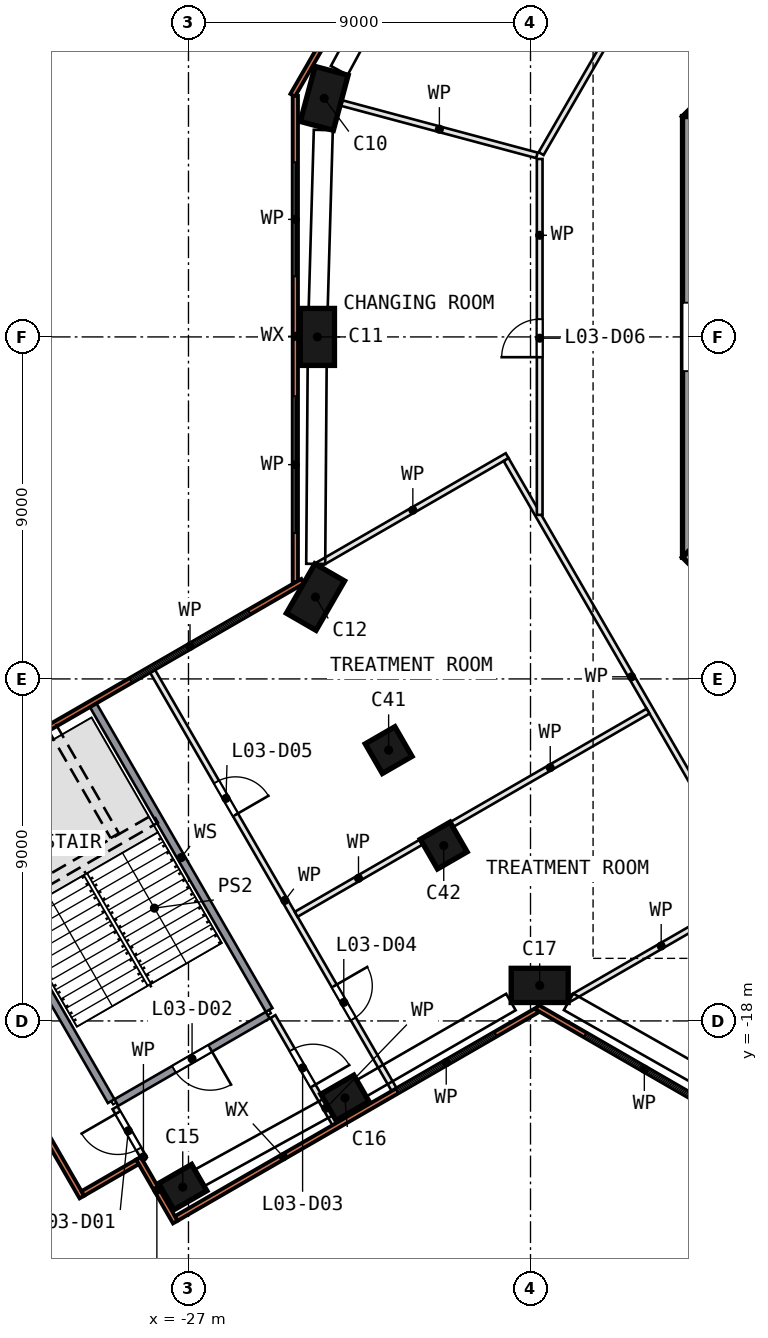
"""IFC4 building model, lengths in metres.
Left out: names, types, materials, properties, quantities, classifications, styles, units other than length and angle.
Written with IfcOpenShell. Run it as: python <this file> out.ifc"""

import sys

from ifc_helpers import new_model, si_unit, direction, frame, frame_2d, origin, origin_2d, place, context, subcontext, project, spatial, rectangle, extrude, element, fill, save


model = new_model("IFC4")
c1 = context("Model", 3, precision=1e-05, world=origin(), true_north=direction((0.0, 1.0)))
c2 = subcontext(c1, "Body", "Model", "MODEL_VIEW")
j1 = project(units=[si_unit("LENGTHUNIT", "METRE"), si_unit("PLANEANGLEUNIT", "RADIAN")], contexts=[c1])
p1 = place(None, origin())
s1 = spatial("IfcSite", under=j1, at=p1, CompositionType="ELEMENT")
p2 = place(p1, origin())
s2 = spatial("IfcBuilding", under=s1, at=p2, CompositionType="ELEMENT")
p3 = place(p2, frame((0.0, 0.0, 19.0)))
s3 = spatial("IfcBuildingStorey", under=s2, at=p3, CompositionType="ELEMENT", Elevation=19.0)
for number, where, z_axis, x_axis in (
    (1, (-23.428, 6.278, 0.0), (0.0, 0.0, 1.0), (0.259, 0.966, 0.0)),
    (2, (-23.608, 0.0, 0.0), (0.0, 0.0, 1.0), (0.0, -1.0, 0.0)),
    (3, (-23.658, -6.846, 0.0), (0.0, 0.0, 1.0), (0.5, 0.866, 0.0)),
):
    element("IfcColumn", number, at=place(p3, frame(where, z_axis=z_axis, x_axis=x_axis)), inside=s3, PredefinedType="COLUMN", context=c2, shape_type="SweptSolid", body=[
        extrude(rectangle(XDim=1.5, YDim=0.9, at=origin_2d()), origin(), (0.0, 0.0, 1.0), 4.05),
    ])
for number, where, z_axis, x_axis in (
    (4, (-27.151, -22.373, 0.0), (0.0, 0.0, 1.0), (0.866, 0.5, 0.0)),
    (5, (-22.883, -20.024, 0.0), (0.0, 0.0, 1.0), (0.866, 0.5, 0.0)),
):
    element("IfcColumn", number, at=place(p3, frame(where, z_axis=z_axis, x_axis=x_axis)), inside=s3, PredefinedType="COLUMN", context=c2, shape_type="SweptSolid", body=[
        extrude(rectangle(XDim=1.0, YDim=0.8, at=origin_2d()), origin(), (0.0, 0.0, 1.0), 4.05),
    ])
p4 = place(p3, frame((-17.758, -17.065, 0.0), z_axis=(0.0, 0.0, 1.0), x_axis=(-1.0, 0.0, 0.0)))
e6 = element("IfcColumn", 6, at=p4, inside=s3, PredefinedType="COLUMN", context=c2, shape_type="SweptSolid", body=[
    extrude(rectangle(XDim=1.5, YDim=0.9, at=origin_2d()), origin(), (0.0, 0.0, 1.0), 4.05),
])
for number, where, z_axis, x_axis in (
    (7, (-21.733, -10.873, 0.0), (0.0, 0.0, 1.0), (-0.866, -0.5, 0.0)),
    (8, (-20.283, -13.385, 0.0), (0.0, 0.0, 1.0), (-0.866, -0.5, 0.0)),
):
    element("IfcColumn", number, at=place(p3, frame(where, z_axis=z_axis, x_axis=x_axis)), inside=s3, PredefinedType="COLUMN", context=c2, shape_type="SweptSolid", body=[
        extrude(rectangle(XDim=0.9, YDim=0.9, at=origin_2d()), origin(), (0.0, 0.0, 1.0), 4.05),
    ])
p5 = place(p3, frame((-5.481, 13.682, 0.0), z_axis=(0.0, 0.0, 1.0), x_axis=(-0.707106781, -0.707106781, 0.0)))
e9 = element("IfcWall", 9, at=p5, inside=s3, PredefinedType="SHEAR", context=c2, shape_type="SweptSolid", body=[
    extrude(rectangle(XDim=11.598, YDim=0.9, at=frame_2d((5.799, 0.0))), origin(), (0.0, 0.0, 1.0), 4.5),
])
p6 = place(p3, frame((-13.55, 5.799, 0.0), z_axis=(0.0, 0.0, 1.0), x_axis=(0.0, -1.0, 0.0)))
e10 = element("IfcWall", 10, at=p6, inside=s3, PredefinedType="SHEAR", context=c2, shape_type="SweptSolid", body=[
    extrude(rectangle(XDim=11.598, YDim=0.9, at=frame_2d((5.799, 0.0))), origin(), (0.0, 0.0, 1.0), 4.5),
])
p7 = place(p6, frame((4.899, 0.0, 0.0)))
e11 = element("IfcOpeningElement", 11, at=p7, cuts=e10, PredefinedType="OPENING", context=c2, shape_type="SweptSolid", body=[
    extrude(rectangle(XDim=1.8, YDim=2.1, at=frame_2d((0.9, 1.05))), frame((0.0, 0.46, 0.0), z_axis=(0.0, -1.0, 0.0), x_axis=(1.0, 0.0, 0.0)), (0.0, 0.0, 1.0), 0.92),
])
p8 = place(p3, frame((-13.682, -5.481, 0.0), z_axis=(0.0, 0.0, 1.0), x_axis=(0.707106781, -0.707106781, 0.0)))
e12 = element("IfcWall", 12, at=p8, inside=s3, PredefinedType="SHEAR", context=c2, shape_type="SweptSolid", body=[
    extrude(rectangle(XDim=11.598, YDim=0.9, at=frame_2d((5.799, 0.0))), origin(), (0.0, 0.0, 1.0), 4.5),
])
p9 = place(p8, frame((2.099, 0.0, 0.0)))
e13 = element("IfcOpeningElement", 13, at=p9, cuts=e12, PredefinedType="OPENING", context=c2, shape_type="SweptSolid", body=[
    extrude(rectangle(XDim=1.2, YDim=2.1, at=frame_2d((0.6, 1.05))), frame((0.0, 0.46, 0.0), z_axis=(0.0, -1.0, 0.0), x_axis=(1.0, 0.0, 0.0)), (0.0, 0.0, 1.0), 0.92),
])
p10 = place(p3, frame((-17.777, 17.586, 0.0), z_axis=(0.0, 0.0, 1.0), x_axis=(-0.500006139, -0.866021859, 0.0)))
e14 = element("IfcWall", 14, at=p10, inside=s3, PredefinedType="SOLIDWALL", context=c2, shape_type="SweptSolid", body=[
    extrude(rectangle(XDim=12.962, YDim=0.14, at=frame_2d((6.481, 0.0))), origin(), (0.0, 0.0, 1.0), 4.05),
])
p11 = place(p10, frame((1.748, 0.0, 0.9)))
e15 = element("IfcOpeningElement", 15, at=p11, cuts=e14, PredefinedType="OPENING", context=c2, shape_type="SweptSolid", body=[
    extrude(rectangle(XDim=3.0, YDim=2.4, at=frame_2d((1.5, 1.2))), frame((0.0, 0.08, 0.0), z_axis=(0.0, -1.0, 0.0), x_axis=(1.0, 0.0, 0.0)), (0.0, 0.0, 1.0), 0.16),
])
p12 = place(p10, frame((7.935, 0.0, 0.9)))
e16 = element("IfcOpeningElement", 16, at=p12, cuts=e14, PredefinedType="OPENING", context=c2, shape_type="SweptSolid", body=[
    extrude(rectangle(XDim=3.0, YDim=2.4, at=frame_2d((1.5, 1.2))), frame((0.0, 0.08, 0.0), z_axis=(0.0, -1.0, 0.0), x_axis=(1.0, 0.0, 0.0)), (0.0, 0.0, 1.0), 0.16),
])
p13 = place(p3, frame((-24.188, 6.341, 0.0), z_axis=(0.0, 0.0, 1.0), x_axis=(0.0, -1.0, 0.0)))
e17 = element("IfcWall", 17, at=p13, inside=s3, PredefinedType="SOLIDWALL", context=c2, shape_type="SweptSolid", body=[
    extrude(rectangle(XDim=12.801, YDim=0.14, at=frame_2d((6.4, 0.0))), origin(), (0.0, 0.0, 1.0), 4.05),
])
p14 = place(p13, frame((1.748, 0.0, 0.9)))
e18 = element("IfcOpeningElement", 18, at=p14, cuts=e17, PredefinedType="OPENING", context=c2, shape_type="SweptSolid", body=[
    extrude(rectangle(XDim=3.0, YDim=2.4, at=frame_2d((1.5, 1.2))), frame((0.0, 0.08, 0.0), z_axis=(0.0, -1.0, 0.0), x_axis=(1.0, 0.0, 0.0)), (0.0, 0.0, 1.0), 0.16),
])
p15 = place(p13, frame((7.902, 0.0, 0.9)))
e19 = element("IfcOpeningElement", 19, at=p15, cuts=e17, PredefinedType="OPENING", context=c2, shape_type="SweptSolid", body=[
    extrude(rectangle(XDim=3.6, YDim=2.4, at=frame_2d((1.8, 1.2))), frame((0.0, 0.08, 0.0), z_axis=(0.0, -1.0, 0.0), x_axis=(1.0, 0.0, 0.0)), (0.0, 0.0, 1.0), 0.16),
])
p16 = place(p3, frame((-23.995, -6.429, 0.0), z_axis=(0.0, 0.0, 1.0), x_axis=(-0.866018753, -0.500011519, 0.0)))
e20 = element("IfcWall", 20, at=p16, inside=s3, PredefinedType="SOLIDWALL", context=c2, shape_type="SweptSolid", body=[
    extrude(rectangle(XDim=11.405, YDim=0.14, at=frame_2d((5.703, 0.0))), origin(), (0.0, 0.0, 1.0), 4.05),
])
p17 = place(p16, frame((1.623, 0.0, 0.9)))
e21 = element("IfcOpeningElement", 21, at=p17, cuts=e20, PredefinedType="OPENING", context=c2, shape_type="SweptSolid", body=[
    extrude(rectangle(XDim=3.6, YDim=2.4, at=frame_2d((1.8, 1.2))), frame((0.0, 0.08, 0.0), z_axis=(0.0, -1.0, 0.0), x_axis=(1.0, 0.0, 0.0)), (0.0, 0.0, 1.0), 0.16),
])
p18 = place(p3, frame((-30.775, -20.955, 0.0), z_axis=(0.0, 0.0, 1.0), x_axis=(0.499969368, -0.866043088, 0.0)))
e22 = element("IfcWall", 22, at=p18, inside=s3, PredefinedType="SOLIDWALL", context=c2, shape_type="SweptSolid", body=[
    extrude(rectangle(XDim=1.94, YDim=0.14, at=frame_2d((0.97, 0.0))), origin(), (0.0, 0.0, 1.0), 4.05),
])
p19 = place(p3, frame((-29.78, -22.54, 0.0), z_axis=(0.0, 0.0, 1.0), x_axis=(0.865989634, 0.500061949, 0.0)))
e23 = element("IfcWall", 23, at=p19, inside=s3, PredefinedType="SOLIDWALL", context=c2, shape_type="SweptSolid", body=[
    extrude(rectangle(XDim=1.66, YDim=0.14, at=frame_2d((0.83, 0.0))), origin(), (0.0, 0.0, 1.0), 4.05),
])
p20 = place(p3, frame((-28.317, -21.614, 0.0), z_axis=(0.0, 0.0, 1.0), x_axis=(0.499969368, -0.866043088, 0.0)))
e24 = element("IfcWall", 24, at=p20, inside=s3, PredefinedType="SOLIDWALL", context=c2, shape_type="SweptSolid", body=[
    extrude(rectangle(XDim=1.94, YDim=0.14, at=frame_2d((0.97, 0.0))), origin(), (0.0, 0.0, 1.0), 4.05),
])
p21 = place(p3, frame((-27.321, -23.198, 0.0), z_axis=(0.0, 0.0, 1.0), x_axis=(0.866030546, 0.499991093, 0.0)))
e25 = element("IfcWall", 25, at=p21, inside=s3, PredefinedType="SOLIDWALL", context=c2, shape_type="SweptSolid", body=[
    extrude(rectangle(XDim=10.961, YDim=0.14, at=frame_2d((5.48, 0.0))), origin(), (0.0, 0.0, 1.0), 4.05),
])
p22 = place(p21, frame((6.702, 0.0, 0.9)))
e26 = element("IfcOpeningElement", 26, at=p22, cuts=e25, PredefinedType="OPENING", context=c2, shape_type="SweptSolid", body=[
    extrude(rectangle(XDim=3.0, YDim=2.4, at=frame_2d((1.5, 1.2))), frame((0.0, 0.08, 0.0), z_axis=(0.0, -1.0, 0.0), x_axis=(1.0, 0.0, 0.0)), (0.0, 0.0, 1.0), 0.16),
])
p23 = place(p3, frame((-17.828, -17.637, 0.0), z_axis=(0.0, 0.0, 1.0), x_axis=(0.866029009, -0.499993756, 0.0)))
e27 = element("IfcWall", 27, at=p23, inside=s3, PredefinedType="SOLIDWALL", context=c2, shape_type="SweptSolid", body=[
    extrude(rectangle(XDim=13.242, YDim=0.14, at=frame_2d((6.621, 0.0))), origin(), (0.0, 0.0, 1.0), 4.05),
])
p24 = place(p23, frame((1.46, 0.0, 0.9)))
e28 = element("IfcOpeningElement", 28, at=p24, cuts=e27, PredefinedType="OPENING", context=c2, shape_type="SweptSolid", body=[
    extrude(rectangle(XDim=3.6, YDim=2.4, at=frame_2d((1.8, 1.2))), frame((0.0, 0.08, 0.0), z_axis=(0.0, -1.0, 0.0), x_axis=(1.0, 0.0, 0.0)), (0.0, 0.0, 1.0), 0.16),
])
p25 = place(p23, frame((8.215, 0.0, 0.9)))
e29 = element("IfcOpeningElement", 29, at=p25, cuts=e27, PredefinedType="OPENING", context=c2, shape_type="SweptSolid", body=[
    extrude(rectangle(XDim=3.0, YDim=2.4, at=frame_2d((1.5, 1.2))), frame((0.0, 0.08, 0.0), z_axis=(0.0, -1.0, 0.0), x_axis=(1.0, 0.0, 0.0)), (0.0, 0.0, 1.0), 0.16),
])
p26 = place(p3, frame((-32.807, -13.577, 0.0), z_axis=(0.0, 0.0, 1.0), x_axis=(0.50000534, -0.866022321, 0.0)))
e30 = element("IfcWall", 30, at=p26, inside=s3, PredefinedType="SOLIDWALL", context=c2, shape_type="SweptSolid", body=[
    extrude(rectangle(XDim=7.545, YDim=0.2, at=frame_2d((3.773, 0.0))), origin(), (0.0, 0.0, 1.0), 4.05),
])
p27 = place(p3, frame((-28.162, -21.623, 0.0), z_axis=(0.0, 0.0, 1.0), x_axis=(-0.499877454, 0.866096144, 0.0)))
e31 = element("IfcWall", 31, at=p27, inside=s3, PredefinedType="PARTITIONING", context=c2, shape_type="SweptSolid", body=[
    extrude(rectangle(XDim=1.545, YDim=0.15, at=frame_2d((0.773, 0.0))), origin(), (0.0, 0.0, 1.0), 4.05),
])
p28 = place(p27, frame((0.295, 0.0, 0.0)))
e32 = element("IfcOpeningElement", 32, at=p28, cuts=e31, PredefinedType="OPENING", context=c2, shape_type="SweptSolid", body=[
    extrude(rectangle(XDim=1.1, YDim=2.1, at=frame_2d((0.55, 1.05))), frame((0.0, 0.085, 0.0), z_axis=(0.0, -1.0, 0.0), x_axis=(1.0, 0.0, 0.0)), (0.0, 0.0, 1.0), 0.17),
])
p29 = place(p3, frame((-24.914, -17.848, 0.0), z_axis=(0.0, 0.0, 1.0), x_axis=(-0.86601677, -0.500014953, 0.0)))
e33 = element("IfcWall", 33, at=p29, inside=s3, PredefinedType="SOLIDWALL", context=c2, shape_type="SweptSolid", body=[
    extrude(rectangle(XDim=4.6, YDim=0.2, at=frame_2d((2.3, 0.0))), origin(), (0.0, 0.0, 1.0), 4.05),
])
p30 = place(p29, frame((1.75, 0.0, 0.0)))
e34 = element("IfcOpeningElement", 34, at=p30, cuts=e33, PredefinedType="OPENING", context=c2, shape_type="SweptSolid", body=[
    extrude(rectangle(XDim=1.1, YDim=2.1, at=frame_2d((0.55, 1.05))), frame((0.0, 0.11, 0.0), z_axis=(0.0, -1.0, 0.0), x_axis=(1.0, 0.0, 0.0)), (0.0, 0.0, 1.0), 0.22),
])
p31 = place(p3, frame((-24.877, -17.712, 0.0), z_axis=(0.0, 0.0, 1.0), x_axis=(-0.499984148, 0.866034555, 0.0)))
e35 = element("IfcWall", 35, at=p31, inside=s3, PredefinedType="SOLIDWALL", context=c2, shape_type="SweptSolid", body=[
    extrude(rectangle(XDim=9.26, YDim=0.2, at=frame_2d((4.63, 0.0))), origin(), (0.0, 0.0, 1.0), 4.05),
])
p32 = place(p3, frame((-22.965, 6.153, 0.0), z_axis=(0.0, 0.0, 1.0), x_axis=(0.965919345, -0.258843233, 0.0)))
e36 = element("IfcWall", 36, at=p32, inside=s3, PredefinedType="PARTITIONING", context=c2, shape_type="SweptSolid", body=[
    extrude(rectangle(XDim=5.315, YDim=0.15, at=frame_2d((2.657, 0.0))), origin(), (0.0, 0.0, 1.0), 4.05),
])
p33 = place(p3, frame((-24.777, -17.885, 0.0), z_axis=(0.0, 0.0, 1.0), x_axis=(0.499996863, -0.866027215, 0.0)))
e37 = element("IfcWall", 37, at=p33, inside=s3, PredefinedType="PARTITIONING", context=c2, shape_type="SweptSolid", body=[
    extrude(rectangle(XDim=3.26, YDim=0.15, at=frame_2d((1.63, 0.0))), origin(), (0.0, 0.0, 1.0), 4.05),
])
p34 = place(p33, frame((1.01, 0.0, 0.0)))
e38 = element("IfcOpeningElement", 38, at=p34, cuts=e37, PredefinedType="OPENING", context=c2, shape_type="SweptSolid", body=[
    extrude(rectangle(XDim=1.1, YDim=2.1, at=frame_2d((0.55, 1.05))), frame((0.0, 0.085, 0.0), z_axis=(0.0, -1.0, 0.0), x_axis=(1.0, 0.0, 0.0)), (0.0, 0.0, 1.0), 0.17),
])
p35 = place(p3, frame((-27.948, -8.792, 0.0), z_axis=(0.0, 0.0, 1.0), x_axis=(0.499991053, -0.866030569, 0.0)))
e39 = element("IfcWall", 39, at=p35, inside=s3, PredefinedType="PARTITIONING", context=c2, shape_type="SweptSolid", body=[
    extrude(rectangle(XDim=12.72, YDim=0.15, at=frame_2d((6.36, 0.0))), origin(), (0.0, 0.0, 1.0), 4.05),
])
p36 = place(p35, frame((9.57, 0.0, 0.0)))
e40 = element("IfcOpeningElement", 40, at=p36, cuts=e39, PredefinedType="OPENING", context=c2, shape_type="SweptSolid", body=[
    extrude(rectangle(XDim=1.0, YDim=2.1, at=frame_2d((0.5, 1.05))), frame((0.0, 0.085, 0.0), z_axis=(0.0, -1.0, 0.0), x_axis=(1.0, 0.0, 0.0)), (0.0, 0.0, 1.0), 0.17),
])
p37 = place(p35, frame((3.37, 0.0, 0.0)))
e41 = element("IfcOpeningElement", 41, at=p37, cuts=e39, PredefinedType="OPENING", context=c2, shape_type="SweptSolid", body=[
    extrude(rectangle(XDim=1.0, YDim=2.1, at=frame_2d((0.5, 1.05))), frame((0.0, 0.085, 0.0), z_axis=(0.0, -1.0, 0.0), x_axis=(1.0, 0.0, 0.0)), (0.0, 0.0, 1.0), 0.17),
])
p38 = place(p3, frame((-18.614, -3.126, 0.0), z_axis=(0.0, 0.0, 1.0), x_axis=(-0.866030255, -0.499991598, 0.0)))
e42 = element("IfcWall", 42, at=p38, inside=s3, PredefinedType="PARTITIONING", context=c2, shape_type="SweptSolid", body=[
    extrude(rectangle(XDim=5.732, YDim=0.15, at=frame_2d((2.866, 0.0))), origin(), (0.0, 0.0, 1.0), 4.05),
])
p39 = place(p3, frame((-18.642, -3.228, 0.0), z_axis=(0.0, 0.0, 1.0), x_axis=(0.499988223, -0.866032203, 0.0)))
e43 = element("IfcWall", 43, at=p39, inside=s3, PredefinedType="PARTITIONING", context=c2, shape_type="SweptSolid", body=[
    extrude(rectangle(XDim=13.2, YDim=0.15, at=frame_2d((6.6, 0.0))), origin(), (0.0, 0.0, 1.0), 4.05),
])
p40 = place(p3, frame((-17.758, -4.683, 0.0), z_axis=(0.0, 0.0, 1.0), x_axis=(0.0, 1.0, 0.0)))
e44 = element("IfcWall", 44, at=p40, inside=s3, PredefinedType="PARTITIONING", context=c2, shape_type="SweptSolid", body=[
    extrude(rectangle(XDim=9.367, YDim=0.15, at=frame_2d((4.683, 0.0))), origin(), (0.0, 0.0, 1.0), 4.05),
])
p41 = place(p40, frame((4.15, 0.0, 0.0)))
e45 = element("IfcOpeningElement", 45, at=p41, cuts=e44, PredefinedType="OPENING", context=c2, shape_type="SweptSolid", body=[
    extrude(rectangle(XDim=1.0, YDim=2.1, at=frame_2d((0.5, 1.05))), frame((0.0, 0.085, 0.0), z_axis=(0.0, -1.0, 0.0), x_axis=(1.0, 0.0, 0.0)), (0.0, 0.0, 1.0), 0.17),
])
p42 = place(p3, frame((-13.038, 12.935, 0.0), z_axis=(0.0, 0.0, 1.0), x_axis=(-0.499979668, -0.866037142, 0.0)))
e46 = element("IfcWall", 46, at=p42, inside=s3, PredefinedType="PARTITIONING", context=c2, shape_type="SweptSolid", body=[
    extrude(rectangle(XDim=9.367, YDim=0.15, at=frame_2d((4.683, 0.0))), origin(), (0.0, 0.0, 1.0), 4.05),
])
p43 = place(p42, frame((3.817, 0.0, 0.0)))
e47 = element("IfcOpeningElement", 47, at=p43, cuts=e46, PredefinedType="OPENING", context=c2, shape_type="SweptSolid", body=[
    extrude(rectangle(XDim=1.8, YDim=2.1, at=frame_2d((0.9, 1.05))), frame((0.0, 0.085, 0.0), z_axis=(0.0, -1.0, 0.0), x_axis=(1.0, 0.0, 0.0)), (0.0, 0.0, 1.0), 0.17),
])
p44 = place(p3, frame((-16.978, -17.424, 0.0), z_axis=(0.0, 0.0, 1.0), x_axis=(0.866008599, 0.500029105, 0.0)))
e48 = element("IfcWall", 48, at=p44, inside=s3, PredefinedType="PARTITIONING", context=c2, shape_type="SweptSolid", body=[
    extrude(rectangle(XDim=5.582, YDim=0.15, at=frame_2d((2.791, 0.0))), origin(), (0.0, 0.0, 1.0), 4.05),
])
p45 = place(p3, frame((-20.886, -13.3, 0.0), z_axis=(0.0, 0.0, 1.0), x_axis=(-0.866012734, -0.500021944, 0.0)))
e49 = element("IfcWall", 49, at=p45, inside=s3, PredefinedType="PARTITIONING", context=c2, shape_type="SweptSolid", body=[
    extrude(rectangle(XDim=3.787, YDim=0.15, at=frame_2d((1.894, 0.0))), origin(), (0.0, 0.0, 1.0), 4.05),
])
p46 = place(p3, frame((-14.906, -9.848, 0.0), z_axis=(0.0, 0.0, 1.0), x_axis=(-0.866038559, -0.499977214, 0.0)))
e50 = element("IfcWall", 50, at=p46, inside=s3, PredefinedType="PARTITIONING", context=c2, shape_type="SweptSolid", body=[
    extrude(rectangle(XDim=5.945, YDim=0.15, at=frame_2d((2.973, 0.0))), origin(), (0.0, 0.0, 1.0), 4.05),
])
p47 = place(p14, origin())
e51 = element("IfcWindow", 51, at=p47, inside=s3, PartitioningType="SINGLE_PANEL", PredefinedType="WINDOW", context=c2, shape_type="SweptSolid", body=[
    extrude(rectangle(XDim=3.0, YDim=2.4, at=frame_2d((1.5, 1.2))), frame((0.0, 0.03, 0.0), z_axis=(0.0, -1.0, 0.0), x_axis=(1.0, 0.0, 0.0)), (0.0, 0.0, 1.0), 0.06),
])
fill(e18, e51)
p48 = place(p15, origin())
e52 = element("IfcWindow", 52, at=p48, inside=s3, PartitioningType="SINGLE_PANEL", PredefinedType="WINDOW", context=c2, shape_type="SweptSolid", body=[
    extrude(rectangle(XDim=3.6, YDim=2.4, at=frame_2d((1.8, 1.2))), frame((0.0, 0.03, 0.0), z_axis=(0.0, -1.0, 0.0), x_axis=(1.0, 0.0, 0.0)), (0.0, 0.0, 1.0), 0.06),
])
fill(e19, e52)
p49 = place(p17, origin())
e53 = element("IfcWindow", 53, at=p49, inside=s3, PartitioningType="SINGLE_PANEL", PredefinedType="WINDOW", context=c2, shape_type="SweptSolid", body=[
    extrude(rectangle(XDim=3.6, YDim=2.4, at=frame_2d((1.8, 1.2))), frame((0.0, 0.03, 0.0), z_axis=(0.0, -1.0, 0.0), x_axis=(1.0, 0.0, 0.0)), (0.0, 0.0, 1.0), 0.06),
])
fill(e21, e53)
p50 = place(p22, origin())
e54 = element("IfcWindow", 54, at=p50, inside=s3, PartitioningType="SINGLE_PANEL", PredefinedType="WINDOW", context=c2, shape_type="SweptSolid", body=[
    extrude(rectangle(XDim=3.0, YDim=2.4, at=frame_2d((1.5, 1.2))), frame((0.0, 0.03, 0.0), z_axis=(0.0, -1.0, 0.0), x_axis=(1.0, 0.0, 0.0)), (0.0, 0.0, 1.0), 0.06),
])
fill(e26, e54)
p51 = place(p24, origin())
e55 = element("IfcWindow", 55, at=p51, inside=s3, PartitioningType="SINGLE_PANEL", PredefinedType="WINDOW", context=c2, shape_type="SweptSolid", body=[
    extrude(rectangle(XDim=3.6, YDim=2.4, at=frame_2d((1.8, 1.2))), frame((0.0, 0.03, 0.0), z_axis=(0.0, -1.0, 0.0), x_axis=(1.0, 0.0, 0.0)), (0.0, 0.0, 1.0), 0.06),
])
fill(e28, e55)
p52 = place(p28, origin())
e56 = element("IfcDoor", 56, at=p52, inside=s3, OperationType="SINGLE_SWING_RIGHT", PredefinedType="DOOR", context=c2, shape_type="SweptSolid", body=[
    extrude(rectangle(XDim=1.1, YDim=2.1, at=frame_2d((0.55, 1.05))), frame((0.0, 0.025, 0.0), z_axis=(0.0, -1.0, 0.0), x_axis=(1.0, 0.0, 0.0)), (0.0, 0.0, 1.0), 0.05),
])
fill(e32, e56)
p53 = place(p30, origin())
e57 = element("IfcDoor", 57, at=p53, inside=s3, OperationType="SINGLE_SWING_LEFT", PredefinedType="DOOR", context=c2, shape_type="SweptSolid", body=[
    extrude(rectangle(XDim=1.1, YDim=2.1, at=frame_2d((0.55, 1.05))), frame((0.0, 0.025, 0.0), z_axis=(0.0, -1.0, 0.0), x_axis=(1.0, 0.0, 0.0)), (0.0, 0.0, 1.0), 0.05),
])
fill(e34, e57)
p54 = place(p34, origin())
e58 = element("IfcDoor", 58, at=p54, inside=s3, OperationType="SINGLE_SWING_RIGHT", PredefinedType="DOOR", context=c2, shape_type="SweptSolid", body=[
    extrude(rectangle(XDim=1.1, YDim=2.1, at=frame_2d((0.55, 1.05))), frame((0.0, 0.025, 0.0), z_axis=(0.0, -1.0, 0.0), x_axis=(1.0, 0.0, 0.0)), (0.0, 0.0, 1.0), 0.05),
])
fill(e38, e58)
p55 = place(p36, origin())
e59 = element("IfcDoor", 59, at=p55, inside=s3, OperationType="SINGLE_SWING_LEFT", PredefinedType="DOOR", context=c2, shape_type="SweptSolid", body=[
    extrude(rectangle(XDim=1.0, YDim=2.1, at=frame_2d((0.5, 1.05))), frame((0.0, 0.025, 0.0), z_axis=(0.0, -1.0, 0.0), x_axis=(1.0, 0.0, 0.0)), (0.0, 0.0, 1.0), 0.05),
])
fill(e40, e59)
p56 = place(p37, origin())
e60 = element("IfcDoor", 60, at=p56, inside=s3, OperationType="SINGLE_SWING_RIGHT", PredefinedType="DOOR", context=c2, shape_type="SweptSolid", body=[
    extrude(rectangle(XDim=1.0, YDim=2.1, at=frame_2d((0.5, 1.05))), frame((0.0, 0.025, 0.0), z_axis=(0.0, -1.0, 0.0), x_axis=(1.0, 0.0, 0.0)), (0.0, 0.0, 1.0), 0.05),
])
fill(e41, e60)
p57 = place(p41, origin())
e61 = element("IfcDoor", 61, at=p57, inside=s3, OperationType="SINGLE_SWING_LEFT", PredefinedType="DOOR", context=c2, shape_type="SweptSolid", body=[
    extrude(rectangle(XDim=1.0, YDim=2.1, at=frame_2d((0.5, 1.05))), frame((0.0, 0.025, 0.0), z_axis=(0.0, -1.0, 0.0), x_axis=(1.0, 0.0, 0.0)), (0.0, 0.0, 1.0), 0.05),
])
fill(e45, e61)
save(model, sys.argv[1])
